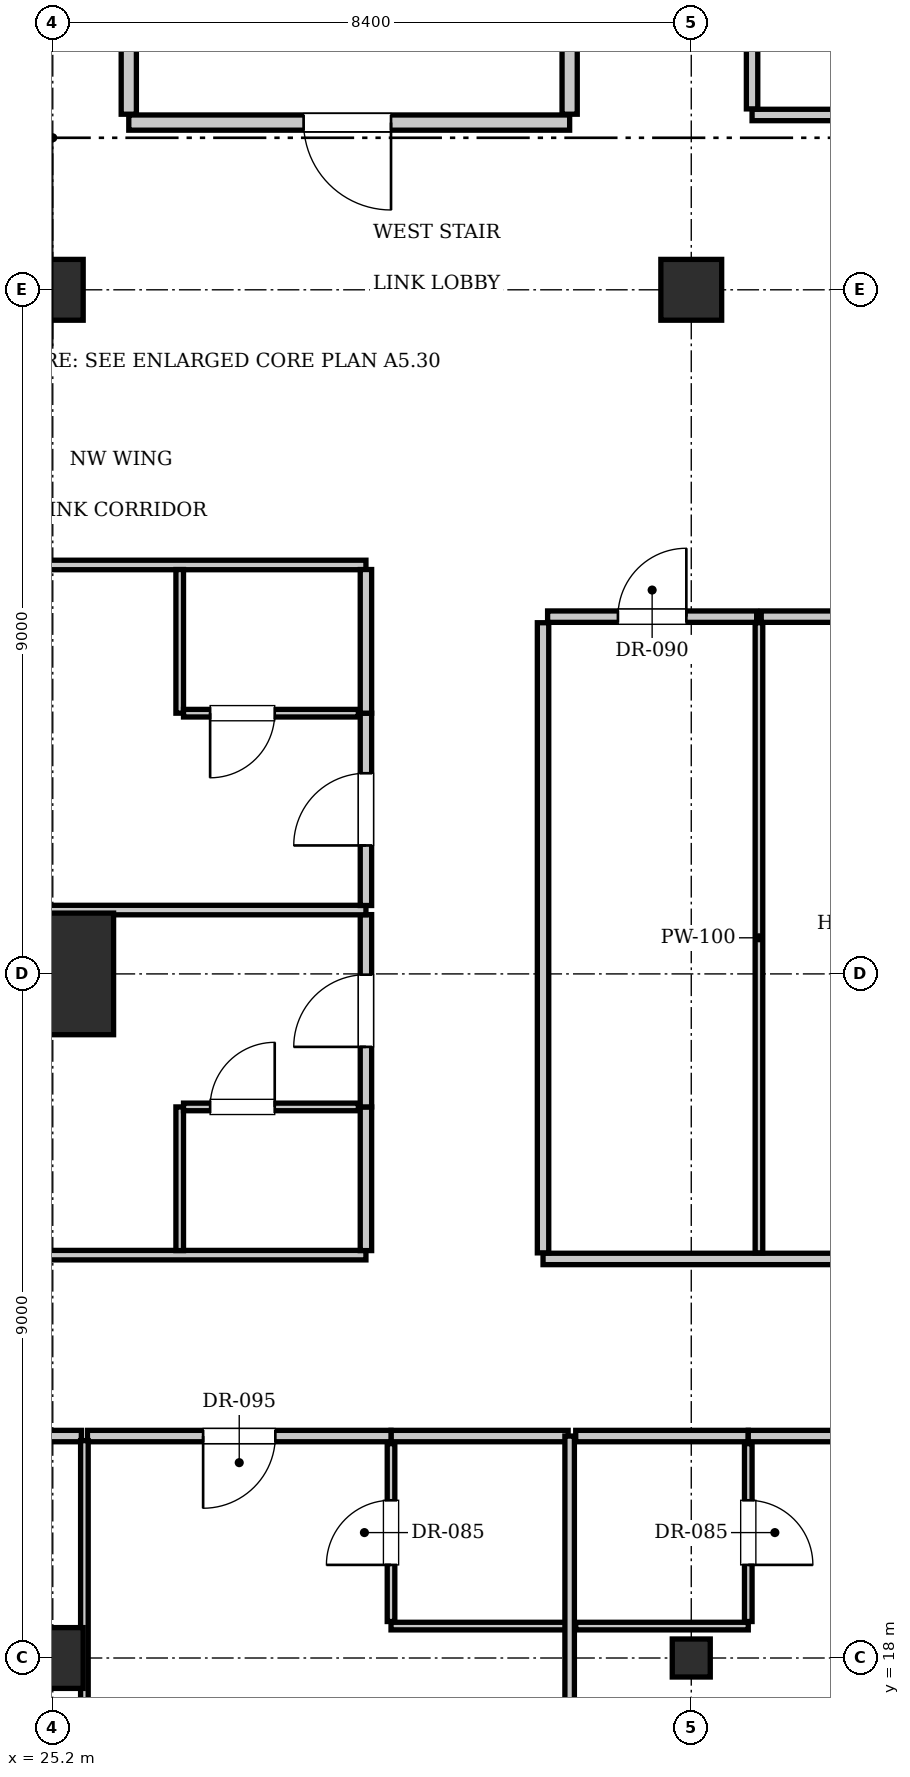
"""IFC4 building model, lengths in metres.
Left out: names, types, materials, properties, quantities, classifications, styles, units other than length and angle.
Written with IfcOpenShell. Run it as: python <this file> out.ifc"""

import sys

from ifc_helpers import new_model, si_unit, direction, frame, frame_2d, origin, origin_2d, place, context, subcontext, project, spatial, rectangle, i_section, extrude, element, fill, save


model = new_model("IFC4")
c1 = context("Model", 3, precision=1e-05, world=origin(), true_north=direction((0.0, 1.0)))
c2 = subcontext(c1, "Body", "Model", "MODEL_VIEW")
j1 = project(units=[si_unit("LENGTHUNIT", "METRE"), si_unit("PLANEANGLEUNIT", "RADIAN")], contexts=[c1])
p1 = place(None, origin())
s1 = spatial("IfcSite", under=j1, at=p1, CompositionType="ELEMENT")
p2 = place(p1, origin())
s2 = spatial("IfcBuilding", under=s1, at=p2, CompositionType="ELEMENT")
p3 = place(p2, frame((0.0, 0.0, 304.85)))
s3 = spatial("IfcBuildingStorey", under=s2, at=p3, CompositionType="ELEMENT", Elevation=304.85)
p4 = place(p3, frame((25.2, 27.0, 0.0), z_axis=(0.0, 0.0, 1.0), x_axis=(1.0, 0.0, 0.0)))
e1 = element("IfcColumn", 1, at=p4, inside=s3, PredefinedType="COLUMN", context=c2, shape_type="SweptSolid", body=[
    extrude(rectangle(XDim=1.6, YDim=1.6, at=origin_2d()), origin(), (0.0, 0.0, 1.0), 3.85),
])
for number, where, z_axis, x_axis in (
    (2, (25.2, 36.0, 0.0), (0.0, 0.0, 1.0), (1.0, 0.0, 0.0)),
    (3, (33.6, 36.0, 0.0), (0.0, 0.0, 1.0), (1.0, 0.0, 0.0)),
    (4, (25.2, 18.0, 0.0), (0.0, 0.0, 1.0), (1.0, 0.0, 0.0)),
):
    element("IfcColumn", number, at=place(p3, frame(where, z_axis=z_axis, x_axis=x_axis)), inside=s3, PredefinedType="COLUMN", context=c2, shape_type="SweptSolid", body=[
        extrude(rectangle(XDim=0.8, YDim=0.8, at=origin_2d()), origin(), (0.0, 0.0, 1.0), 3.85),
    ])
p5 = place(p3, frame((33.6, 18.0, 0.0), z_axis=(0.0, 0.0, 1.0), x_axis=(1.0, 0.0, 0.0)))
e5 = element("IfcColumn", 5, at=p5, inside=s3, PredefinedType="COLUMN", context=c2, shape_type="SweptSolid", body=[
    extrude(i_section(OverallWidth=0.5, OverallDepth=0.5, WebThickness=0.022, FlangeThickness=0.032, at=origin_2d()), origin(), (0.0, 0.0, 1.0), 3.85),
])
p6 = place(p3, frame((26.2, 38.2, 0.0), z_axis=(0.0, 0.0, 1.0), x_axis=(1.0, 0.0, 0.0)))
e6 = element("IfcWall", 6, at=p6, inside=s3, PredefinedType="PARTITIONING", context=c2, shape_type="SweptSolid", body=[
    extrude(rectangle(XDim=5.8, YDim=0.2, at=frame_2d((2.9, 0.0))), origin(), (0.0, 0.0, 1.0), 3.61),
])
p7 = place(p6, frame((2.3, 0.0, 0.0)))
e7 = element("IfcOpeningElement", 7, at=p7, cuts=e6, PredefinedType="OPENING", context=c2, shape_type="SweptSolid", body=[
    extrude(rectangle(XDim=1.15, YDim=2.15, at=frame_2d((0.575, 1.075))), frame((0.0, 0.11, 0.0), z_axis=(0.0, -1.0, 0.0), x_axis=(1.0, 0.0, 0.0)), (0.0, 0.0, 1.0), 0.22),
])
for number, where, z_axis, x_axis in (
    (8, (26.2, 38.31, 0.0), (0.0, 0.0, 1.0), (0.0, 1.0, 0.0)),
    (9, (32.0, 38.31, 0.0), (0.0, 0.0, 1.0), (0.0, 1.0, 0.0)),
):
    element("IfcWall", number, at=place(p3, frame(where, z_axis=z_axis, x_axis=x_axis)), inside=s3, PredefinedType="PARTITIONING", context=c2, shape_type="SweptSolid", body=[
        extrude(rectangle(XDim=3.07, YDim=0.2, at=frame_2d((1.535, 0.0))), origin(), (0.0, 0.0, 1.0), 3.61),
    ])
p8 = place(p3, frame((34.4, 38.3, 0.0), z_axis=(0.0, 0.0, 1.0), x_axis=(1.0, 0.0, 0.0)))
e10 = element("IfcWall", 10, at=p8, inside=s3, PredefinedType="PARTITIONING", context=c2, shape_type="SweptSolid", body=[
    extrude(rectangle(XDim=5.92, YDim=0.15, at=frame_2d((2.96, 0.0))), origin(), (0.0, 0.0, 1.0), 3.61),
])
p9 = place(p8, frame((2.4, 0.0, 0.0)))
e11 = element("IfcOpeningElement", 11, at=p9, cuts=e10, PredefinedType="OPENING", context=c2, shape_type="SweptSolid", body=[
    extrude(rectangle(XDim=0.9, YDim=2.1, at=frame_2d((0.45, 1.05))), frame((0.0, 0.085, 0.0), z_axis=(0.0, -1.0, 0.0), x_axis=(1.0, 0.0, 0.0)), (0.0, 0.0, 1.0), 0.17),
])
p10 = place(p3, frame((34.4, 38.38, 0.0), z_axis=(0.0, 0.0, 1.0), x_axis=(0.0, 1.0, 0.0)))
e12 = element("IfcWall", 12, at=p10, inside=s3, PredefinedType="PARTITIONING", context=c2, shape_type="SweptSolid", body=[
    extrude(rectangle(XDim=2.84, YDim=0.15, at=frame_2d((1.42, 0.0))), origin(), (0.0, 0.0, 1.0), 3.61),
])
p11 = place(p3, frame((31.65, 23.25, 0.0), z_axis=(0.0, 0.0, 1.0), x_axis=(1.0, 0.0, 0.0)))
e13 = element("IfcWall", 13, at=p11, inside=s3, PredefinedType="PARTITIONING", context=c2, shape_type="SweptSolid", body=[
    extrude(rectangle(XDim=12.35, YDim=0.15, at=frame_2d((6.175, 0.0))), origin(), (0.0, 0.0, 1.0), 3.61),
])
p12 = place(p3, frame((31.65, 23.33, 0.0), z_axis=(0.0, 0.0, 1.0), x_axis=(0.0, 1.0, 0.0)))
e14 = element("IfcWall", 14, at=p12, inside=s3, PredefinedType="PARTITIONING", context=c2, shape_type="SweptSolid", body=[
    extrude(rectangle(XDim=8.29, YDim=0.15, at=frame_2d((4.145, 0.0))), origin(), (0.0, 0.0, 1.0), 3.61),
])
p13 = place(p3, frame((31.71, 31.7, 0.0), z_axis=(0.0, 0.0, 1.0), x_axis=(1.0, 0.0, 0.0)))
e15 = element("IfcWall", 15, at=p13, inside=s3, PredefinedType="PARTITIONING", context=c2, shape_type="SweptSolid", body=[
    extrude(rectangle(XDim=2.75, YDim=0.15, at=frame_2d((1.375, 0.0))), origin(), (0.0, 0.0, 1.0), 3.61),
])
p14 = place(p13, frame((0.925, 0.0, 0.0)))
e16 = element("IfcOpeningElement", 16, at=p14, cuts=e15, PredefinedType="OPENING", context=c2, shape_type="SweptSolid", body=[
    extrude(rectangle(XDim=0.9, YDim=2.1, at=frame_2d((0.45, 1.05))), frame((0.0, 0.085, 0.0), z_axis=(0.0, -1.0, 0.0), x_axis=(1.0, 0.0, 0.0)), (0.0, 0.0, 1.0), 0.17),
])
p15 = place(p3, frame((34.49, 23.33, 0.0), z_axis=(0.0, 0.0, 1.0), x_axis=(0.0, 1.0, 0.0)))
e17 = element("IfcWall", 17, at=p15, inside=s3, PredefinedType="PARTITIONING", context=c2, shape_type="SweptSolid", body=[
    extrude(rectangle(XDim=8.29, YDim=0.1, at=frame_2d((4.145, 0.0))), origin(), (0.0, 0.0, 1.0), 3.61),
])
p16 = place(p3, frame((34.521, 31.7, 0.0), z_axis=(0.0, 0.0, 1.0), x_axis=(1.0, 0.0, 0.0)))
e18 = element("IfcWall", 18, at=p16, inside=s3, PredefinedType="PARTITIONING", context=c2, shape_type="SweptSolid", body=[
    extrude(rectangle(XDim=4.139, YDim=0.15, at=frame_2d((2.069, 0.0))), origin(), (0.0, 0.0, 1.0), 3.61),
])
p17 = place(p16, frame((1.619, 0.0, 0.0)))
e19 = element("IfcOpeningElement", 19, at=p17, cuts=e18, PredefinedType="OPENING", context=c2, shape_type="SweptSolid", body=[
    extrude(rectangle(XDim=0.9, YDim=2.1, at=frame_2d((0.45, 1.05))), frame((0.0, 0.085, 0.0), z_axis=(0.0, -1.0, 0.0), x_axis=(1.0, 0.0, 0.0)), (0.0, 0.0, 1.0), 0.17),
])
p18 = place(p3, frame((29.65, 20.92, 0.0), z_axis=(0.0, 0.0, 1.0), x_axis=(1.0, 0.0, 0.0)))
e20 = element("IfcWall", 20, at=p18, inside=s3, PredefinedType="PARTITIONING", context=c2, shape_type="SweptSolid", body=[
    extrude(rectangle(XDim=2.33, YDim=0.15, at=frame_2d((1.165, 0.0))), origin(), (0.0, 0.0, 1.0), 3.61),
])
p19 = place(p3, frame((29.65, 18.42, 0.0), z_axis=(0.0, 0.0, 1.0), x_axis=(1.0, 0.0, 0.0)))
e21 = element("IfcWall", 21, at=p19, inside=s3, PredefinedType="PARTITIONING", context=c2, shape_type="SweptSolid", body=[
    extrude(rectangle(XDim=2.31, YDim=0.1, at=frame_2d((1.155, 0.0))), origin(), (0.0, 0.0, 1.0), 3.61),
])
p20 = place(p3, frame((29.65, 18.48, 0.0), z_axis=(0.0, 0.0, 1.0), x_axis=(0.0, 1.0, 0.0)))
e22 = element("IfcWall", 22, at=p20, inside=s3, PredefinedType="PARTITIONING", context=c2, shape_type="SweptSolid", body=[
    extrude(rectangle(XDim=2.34, YDim=0.1, at=frame_2d((1.17, 0.0))), origin(), (0.0, 0.0, 1.0), 3.61),
])
p21 = place(p20, frame((0.745, 0.0, 0.0)))
e23 = element("IfcOpeningElement", 23, at=p21, cuts=e22, PredefinedType="OPENING", context=c2, shape_type="SweptSolid", body=[
    extrude(rectangle(XDim=0.85, YDim=2.1, at=frame_2d((0.425, 1.05))), frame((0.0, 0.06, 0.0), z_axis=(0.0, -1.0, 0.0), x_axis=(1.0, 0.0, 0.0)), (0.0, 0.0, 1.0), 0.12),
])
p22 = place(p3, frame((20.62, 20.92, 0.0), z_axis=(0.0, 0.0, 1.0), x_axis=(1.0, 0.0, 0.0)))
e24 = element("IfcWall", 24, at=p22, inside=s3, PredefinedType="PARTITIONING", context=c2, shape_type="SweptSolid", body=[
    extrude(rectangle(XDim=4.956, YDim=0.15, at=frame_2d((2.478, 0.0))), origin(), (0.0, 0.0, 1.0), 3.61),
])
p23 = place(p3, frame((25.656, 20.92, 0.0), z_axis=(0.0, 0.0, 1.0), x_axis=(1.0, 0.0, 0.0)))
e25 = element("IfcWall", 25, at=p23, inside=s3, PredefinedType="PARTITIONING", context=c2, shape_type="SweptSolid", body=[
    extrude(rectangle(XDim=3.994, YDim=0.15, at=frame_2d((1.997, 0.0))), origin(), (0.0, 0.0, 1.0), 3.61),
])
p24 = place(p23, frame((1.522, 0.0, 0.0)))
e26 = element("IfcOpeningElement", 26, at=p24, cuts=e25, PredefinedType="OPENING", context=c2, shape_type="SweptSolid", body=[
    extrude(rectangle(XDim=0.95, YDim=2.15, at=frame_2d((0.475, 1.075))), frame((0.0, 0.085, 0.0), z_axis=(0.0, -1.0, 0.0), x_axis=(1.0, 0.0, 0.0)), (0.0, 0.0, 1.0), 0.17),
])
p25 = place(p3, frame((25.616, 9.23, 0.0), z_axis=(0.0, 0.0, 1.0), x_axis=(0.0, 1.0, 0.0)))
e27 = element("IfcWall", 27, at=p25, inside=s3, PredefinedType="PARTITIONING", context=c2, shape_type="SweptSolid", body=[
    extrude(rectangle(XDim=11.63, YDim=0.1, at=frame_2d((5.815, 0.0))), origin(), (0.0, 0.0, 1.0), 3.61),
])
p26 = place(p25, frame((1.6, 0.0, 0.0)))
e28 = element("IfcOpeningElement", 28, at=p26, cuts=e27, PredefinedType="OPENING", context=c2, shape_type="SweptSolid", body=[
    extrude(rectangle(XDim=0.9, YDim=2.1, at=frame_2d((0.45, 1.05))), frame((0.0, 0.06, 0.0), z_axis=(0.0, -1.0, 0.0), x_axis=(1.0, 0.0, 0.0)), (0.0, 0.0, 1.0), 0.12),
])
p27 = place(p3, frame((32.0, 9.3, 0.0), z_axis=(0.0, 0.0, 1.0), x_axis=(0.0, 1.0, 0.0)))
e29 = element("IfcWall", 29, at=p27, inside=s3, PredefinedType="PARTITIONING", context=c2, shape_type="SweptSolid", body=[
    extrude(rectangle(XDim=11.62, YDim=0.125, at=frame_2d((5.81, 0.0))), origin(), (0.0, 0.0, 1.0), 3.61),
])
p28 = place(p3, frame((32.08, 20.92, 0.0), z_axis=(0.0, 0.0, 1.0), x_axis=(1.0, 0.0, 0.0)))
e30 = element("IfcWall", 30, at=p28, inside=s3, PredefinedType="PARTITIONING", context=c2, shape_type="SweptSolid", body=[
    extrude(rectangle(XDim=2.27, YDim=0.15, at=frame_2d((1.135, 0.0))), origin(), (0.0, 0.0, 1.0), 3.61),
])
p29 = place(p3, frame((32.08, 18.42, 0.0), z_axis=(0.0, 0.0, 1.0), x_axis=(1.0, 0.0, 0.0)))
e31 = element("IfcWall", 31, at=p29, inside=s3, PredefinedType="PARTITIONING", context=c2, shape_type="SweptSolid", body=[
    extrude(rectangle(XDim=2.27, YDim=0.1, at=frame_2d((1.135, 0.0))), origin(), (0.0, 0.0, 1.0), 3.61),
])
p30 = place(p3, frame((34.35, 18.48, 0.0), z_axis=(0.0, 0.0, 1.0), x_axis=(0.0, 1.0, 0.0)))
e32 = element("IfcWall", 32, at=p30, inside=s3, PredefinedType="PARTITIONING", context=c2, shape_type="SweptSolid", body=[
    extrude(rectangle(XDim=2.34, YDim=0.1, at=frame_2d((1.17, 0.0))), origin(), (0.0, 0.0, 1.0), 3.61),
])
p31 = place(p30, frame((0.745, 0.0, 0.0)))
e33 = element("IfcOpeningElement", 33, at=p31, cuts=e32, PredefinedType="OPENING", context=c2, shape_type="SweptSolid", body=[
    extrude(rectangle(XDim=0.85, YDim=2.1, at=frame_2d((0.425, 1.05))), frame((0.0, 0.06, 0.0), z_axis=(0.0, -1.0, 0.0), x_axis=(1.0, 0.0, 0.0)), (0.0, 0.0, 1.0), 0.12),
])
p32 = place(p3, frame((34.35, 20.92, 0.0), z_axis=(0.0, 0.0, 1.0), x_axis=(1.0, 0.0, 0.0)))
e34 = element("IfcWall", 34, at=p32, inside=s3, PredefinedType="PARTITIONING", context=c2, shape_type="SweptSolid", body=[
    extrude(rectangle(XDim=4.106, YDim=0.15, at=frame_2d((2.053, 0.0))), origin(), (0.0, 0.0, 1.0), 3.61),
])
p33 = place(p32, frame((1.578, 0.0, 0.0)))
e35 = element("IfcOpeningElement", 35, at=p33, cuts=e34, PredefinedType="OPENING", context=c2, shape_type="SweptSolid", body=[
    extrude(rectangle(XDim=0.95, YDim=2.15, at=frame_2d((0.475, 1.075))), frame((0.0, 0.085, 0.0), z_axis=(0.0, -1.0, 0.0), x_axis=(1.0, 0.0, 0.0)), (0.0, 0.0, 1.0), 0.17),
])
for number, where, z_axis, x_axis in (
    (36, (15.5, 23.3, 0.0), (0.0, 0.0, 1.0), (1.0, 0.0, 0.0)),
    (37, (15.5, 32.38, 0.0), (0.0, 0.0, 1.0), (1.0, 0.0, 0.0)),
):
    element("IfcWall", number, at=place(p3, frame(where, z_axis=z_axis, x_axis=x_axis)), inside=s3, PredefinedType="PARTITIONING", context=c2, shape_type="SweptSolid", body=[
        extrude(rectangle(XDim=13.82, YDim=0.125, at=frame_2d((6.91, 0.0))), origin(), (0.0, 0.0, 1.0), 3.61),
    ])
p34 = place(p3, frame((29.32, 23.36, 0.0), z_axis=(0.0, 0.0, 1.0), x_axis=(0.0, 1.0, 0.0)))
e38 = element("IfcWall", 38, at=p34, inside=s3, PredefinedType="PARTITIONING", context=c2, shape_type="SweptSolid", body=[
    extrude(rectangle(XDim=1.89, YDim=0.15, at=frame_2d((0.945, 0.0))), origin(), (0.0, 0.0, 1.0), 3.61),
])
p35 = place(p3, frame((29.32, 25.25, 0.0), z_axis=(0.0, 0.0, 1.0), x_axis=(0.0, 1.0, 0.0)))
e39 = element("IfcWall", 39, at=p35, inside=s3, PredefinedType="PARTITIONING", context=c2, shape_type="SweptSolid", body=[
    extrude(rectangle(XDim=2.53, YDim=0.15, at=frame_2d((1.265, 0.0))), origin(), (0.0, 0.0, 1.0), 3.61),
])
p36 = place(p35, frame((0.79, 0.0, 0.0)))
e40 = element("IfcOpeningElement", 40, at=p36, cuts=e39, PredefinedType="OPENING", context=c2, shape_type="SweptSolid", body=[
    extrude(rectangle(XDim=0.95, YDim=2.15, at=frame_2d((0.475, 1.075))), frame((0.0, 0.085, 0.0), z_axis=(0.0, -1.0, 0.0), x_axis=(1.0, 0.0, 0.0)), (0.0, 0.0, 1.0), 0.17),
])
p37 = place(p3, frame((26.87, 23.36, 0.0), z_axis=(0.0, 0.0, 1.0), x_axis=(0.0, 1.0, 0.0)))
e41 = element("IfcWall", 41, at=p37, inside=s3, PredefinedType="PARTITIONING", context=c2, shape_type="SweptSolid", body=[
    extrude(rectangle(XDim=1.89, YDim=0.1, at=frame_2d((0.945, 0.0))), origin(), (0.0, 0.0, 1.0), 3.61),
])
p38 = place(p3, frame((26.92, 25.25, 0.0), z_axis=(0.0, 0.0, 1.0), x_axis=(1.0, 0.0, 0.0)))
e42 = element("IfcWall", 42, at=p38, inside=s3, PredefinedType="PARTITIONING", context=c2, shape_type="SweptSolid", body=[
    extrude(rectangle(XDim=2.3, YDim=0.1, at=frame_2d((1.15, 0.0))), origin(), (0.0, 0.0, 1.0), 3.61),
])
p39 = place(p38, frame((0.35, 0.0, 0.0)))
e43 = element("IfcOpeningElement", 43, at=p39, cuts=e42, PredefinedType="OPENING", context=c2, shape_type="SweptSolid", body=[
    extrude(rectangle(XDim=0.85, YDim=2.1, at=frame_2d((0.425, 1.05))), frame((0.0, 0.06, 0.0), z_axis=(0.0, -1.0, 0.0), x_axis=(1.0, 0.0, 0.0)), (0.0, 0.0, 1.0), 0.12),
])
p40 = place(p3, frame((15.5, 27.84, 0.0), z_axis=(0.0, 0.0, 1.0), x_axis=(1.0, 0.0, 0.0)))
e44 = element("IfcWall", 44, at=p40, inside=s3, PredefinedType="PARTITIONING", context=c2, shape_type="SweptSolid", body=[
    extrude(rectangle(XDim=13.82, YDim=0.125, at=frame_2d((6.91, 0.0))), origin(), (0.0, 0.0, 1.0), 3.61),
])
p41 = place(p3, frame((29.32, 27.9, 0.0), z_axis=(0.0, 0.0, 1.0), x_axis=(0.0, 1.0, 0.0)))
e45 = element("IfcWall", 45, at=p41, inside=s3, PredefinedType="PARTITIONING", context=c2, shape_type="SweptSolid", body=[
    extrude(rectangle(XDim=2.53, YDim=0.15, at=frame_2d((1.265, 0.0))), origin(), (0.0, 0.0, 1.0), 3.61),
])
p42 = place(p41, frame((0.79, 0.0, 0.0)))
e46 = element("IfcOpeningElement", 46, at=p42, cuts=e45, PredefinedType="OPENING", context=c2, shape_type="SweptSolid", body=[
    extrude(rectangle(XDim=0.95, YDim=2.15, at=frame_2d((0.475, 1.075))), frame((0.0, 0.085, 0.0), z_axis=(0.0, -1.0, 0.0), x_axis=(1.0, 0.0, 0.0)), (0.0, 0.0, 1.0), 0.17),
])
p43 = place(p3, frame((29.32, 30.43, 0.0), z_axis=(0.0, 0.0, 1.0), x_axis=(0.0, 1.0, 0.0)))
e47 = element("IfcWall", 47, at=p43, inside=s3, PredefinedType="PARTITIONING", context=c2, shape_type="SweptSolid", body=[
    extrude(rectangle(XDim=1.89, YDim=0.15, at=frame_2d((0.945, 0.0))), origin(), (0.0, 0.0, 1.0), 3.61),
])
p44 = place(p3, frame((26.87, 30.43, 0.0), z_axis=(0.0, 0.0, 1.0), x_axis=(0.0, 1.0, 0.0)))
e48 = element("IfcWall", 48, at=p44, inside=s3, PredefinedType="PARTITIONING", context=c2, shape_type="SweptSolid", body=[
    extrude(rectangle(XDim=1.89, YDim=0.1, at=frame_2d((0.945, 0.0))), origin(), (0.0, 0.0, 1.0), 3.61),
])
p45 = place(p3, frame((26.92, 30.43, 0.0), z_axis=(0.0, 0.0, 1.0), x_axis=(1.0, 0.0, 0.0)))
e49 = element("IfcWall", 49, at=p45, inside=s3, PredefinedType="PARTITIONING", context=c2, shape_type="SweptSolid", body=[
    extrude(rectangle(XDim=2.3, YDim=0.1, at=frame_2d((1.15, 0.0))), origin(), (0.0, 0.0, 1.0), 3.61),
])
p46 = place(p45, frame((0.35, 0.0, 0.0)))
e50 = element("IfcOpeningElement", 50, at=p46, cuts=e49, PredefinedType="OPENING", context=c2, shape_type="SweptSolid", body=[
    extrude(rectangle(XDim=0.85, YDim=2.1, at=frame_2d((0.425, 1.05))), frame((0.0, 0.06, 0.0), z_axis=(0.0, -1.0, 0.0), x_axis=(1.0, 0.0, 0.0)), (0.0, 0.0, 1.0), 0.12),
])
p47 = place(p7, frame((1.15, 0.0, 0.0), z_axis=(0.0, 0.0, 1.0), x_axis=(-1.0, 0.0, 0.0)))
e51 = element("IfcDoor", 51, at=p47, inside=s3, OperationType="SINGLE_SWING_LEFT", PredefinedType="DOOR", context=c2, shape_type="SweptSolid", body=[
    extrude(rectangle(XDim=1.15, YDim=2.15, at=frame_2d((0.575, 1.075))), frame((0.0, 0.025, 0.0), z_axis=(0.0, -1.0, 0.0), x_axis=(1.0, 0.0, 0.0)), (0.0, 0.0, 1.0), 0.05),
])
fill(e7, e51)
p48 = place(p14, origin())
e52 = element("IfcDoor", 52, at=p48, inside=s3, OperationType="SINGLE_SWING_RIGHT", PredefinedType="DOOR", context=c2, shape_type="SweptSolid", body=[
    extrude(rectangle(XDim=0.9, YDim=2.1, at=frame_2d((0.45, 1.05))), frame((0.0, 0.025, 0.0), z_axis=(0.0, -1.0, 0.0), x_axis=(1.0, 0.0, 0.0)), (0.0, 0.0, 1.0), 0.05),
])
fill(e16, e52)
p49 = place(p21, origin())
e53 = element("IfcDoor", 53, at=p49, inside=s3, OperationType="SINGLE_SWING_LEFT", PredefinedType="DOOR", context=c2, shape_type="SweptSolid", body=[
    extrude(rectangle(XDim=0.85, YDim=2.1, at=frame_2d((0.425, 1.05))), frame((0.0, 0.025, 0.0), z_axis=(0.0, -1.0, 0.0), x_axis=(1.0, 0.0, 0.0)), (0.0, 0.0, 1.0), 0.05),
])
fill(e23, e53)
p50 = place(p24, frame((0.95, 0.0, 0.0), z_axis=(0.0, 0.0, 1.0), x_axis=(-1.0, 0.0, 0.0)))
e54 = element("IfcDoor", 54, at=p50, inside=s3, OperationType="SINGLE_SWING_RIGHT", PredefinedType="DOOR", context=c2, shape_type="SweptSolid", body=[
    extrude(rectangle(XDim=0.95, YDim=2.15, at=frame_2d((0.475, 1.075))), frame((0.0, 0.025, 0.0), z_axis=(0.0, -1.0, 0.0), x_axis=(1.0, 0.0, 0.0)), (0.0, 0.0, 1.0), 0.05),
])
fill(e26, e54)
p51 = place(p31, frame((0.85, 0.0, 0.0), z_axis=(0.0, 0.0, 1.0), x_axis=(-1.0, 0.0, 0.0)))
e55 = element("IfcDoor", 55, at=p51, inside=s3, OperationType="SINGLE_SWING_RIGHT", PredefinedType="DOOR", context=c2, shape_type="SweptSolid", body=[
    extrude(rectangle(XDim=0.85, YDim=2.1, at=frame_2d((0.425, 1.05))), frame((0.0, 0.025, 0.0), z_axis=(0.0, -1.0, 0.0), x_axis=(1.0, 0.0, 0.0)), (0.0, 0.0, 1.0), 0.05),
])
fill(e33, e55)
p52 = place(p39, origin())
e56 = element("IfcDoor", 56, at=p52, inside=s3, OperationType="SINGLE_SWING_RIGHT", PredefinedType="DOOR", context=c2, shape_type="SweptSolid", body=[
    extrude(rectangle(XDim=0.85, YDim=2.1, at=frame_2d((0.425, 1.05))), frame((0.0, 0.025, 0.0), z_axis=(0.0, -1.0, 0.0), x_axis=(1.0, 0.0, 0.0)), (0.0, 0.0, 1.0), 0.05),
])
fill(e43, e56)
p53 = place(p36, origin())
e57 = element("IfcDoor", 57, at=p53, inside=s3, OperationType="SINGLE_SWING_LEFT", PredefinedType="DOOR", context=c2, shape_type="SweptSolid", body=[
    extrude(rectangle(XDim=0.95, YDim=2.15, at=frame_2d((0.475, 1.075))), frame((0.0, 0.025, 0.0), z_axis=(0.0, -1.0, 0.0), x_axis=(1.0, 0.0, 0.0)), (0.0, 0.0, 1.0), 0.05),
])
fill(e40, e57)
p54 = place(p46, frame((0.85, 0.0, 0.0), z_axis=(0.0, 0.0, 1.0), x_axis=(-1.0, 0.0, 0.0)))
e58 = element("IfcDoor", 58, at=p54, inside=s3, OperationType="SINGLE_SWING_RIGHT", PredefinedType="DOOR", context=c2, shape_type="SweptSolid", body=[
    extrude(rectangle(XDim=0.85, YDim=2.1, at=frame_2d((0.425, 1.05))), frame((0.0, 0.025, 0.0), z_axis=(0.0, -1.0, 0.0), x_axis=(1.0, 0.0, 0.0)), (0.0, 0.0, 1.0), 0.05),
])
fill(e50, e58)
p55 = place(p42, origin())
e59 = element("IfcDoor", 59, at=p55, inside=s3, OperationType="SINGLE_SWING_LEFT", PredefinedType="DOOR", context=c2, shape_type="SweptSolid", body=[
    extrude(rectangle(XDim=0.95, YDim=2.15, at=frame_2d((0.475, 1.075))), frame((0.0, 0.025, 0.0), z_axis=(0.0, -1.0, 0.0), x_axis=(1.0, 0.0, 0.0)), (0.0, 0.0, 1.0), 0.05),
])
fill(e46, e59)
save(model, sys.argv[1])
